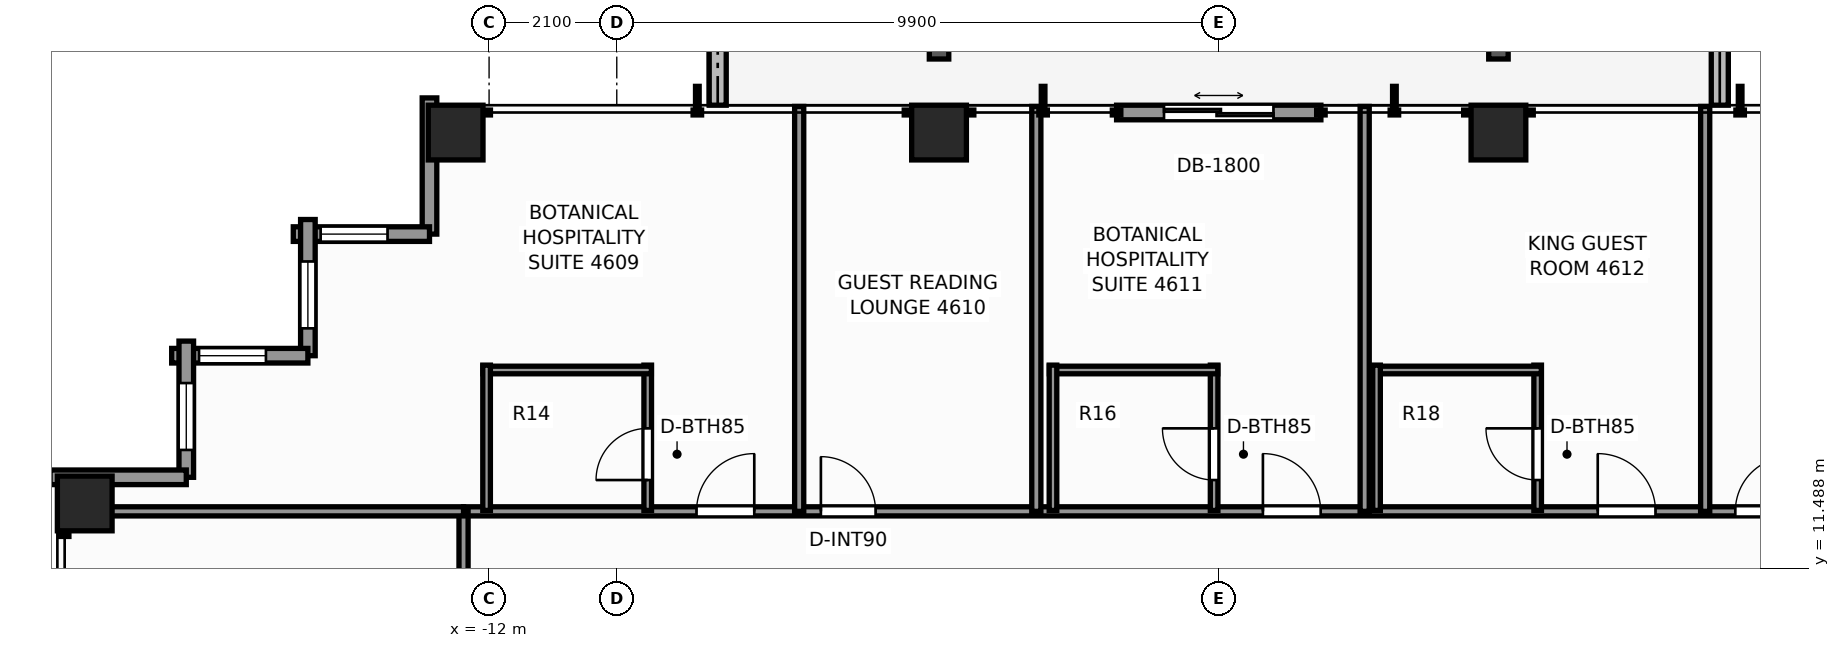
"""IFC4 building model, lengths in metres.
Left out: names, types, materials, properties, quantities, classifications, styles, units other than length and angle.
Written with IfcOpenShell. Run it as: python <this file> out.ifc"""

import sys

from ifc_helpers import new_model, si_unit, direction, frame, frame_2d, origin, origin_2d, place, context, subcontext, project, spatial, rectangle, extrude, element, fill, save


model = new_model("IFC4")
c1 = context("Model", 3, precision=1e-05, world=origin(), true_north=direction((0.0, 1.0)))
c2 = subcontext(c1, "Body", "Model", "MODEL_VIEW")
j1 = project(units=[si_unit("LENGTHUNIT", "METRE"), si_unit("PLANEANGLEUNIT", "RADIAN")], contexts=[c1])
p1 = place(None, origin())
s1 = spatial("IfcSite", under=j1, at=p1, CompositionType="ELEMENT")
p2 = place(p1, origin())
s2 = spatial("IfcBuilding", under=s1, at=p2, CompositionType="ELEMENT")
p3 = place(p2, frame((0.0, 0.0, 160.2)))
s3 = spatial("IfcBuildingStorey", under=s2, at=p3, CompositionType="ELEMENT", Elevation=160.2)
for number, where, z_axis, x_axis in (
    (1, (-12.55, 18.65, 0.0), (0.0, 0.0, 1.0), (1.0, 0.0, 0.0)),
    (2, (-4.6, 18.65, 0.0), (0.0, 0.0, 1.0), (1.0, 0.0, 0.0)),
    (3, (4.6, 18.65, 0.0), (0.0, 0.0, 1.0), (1.0, 0.0, 0.0)),
    (4, (-18.65, 12.55, 0.0), (0.0, 0.0, 1.0), (1.0, 0.0, 0.0)),
):
    element("IfcColumn", number, at=place(p3, frame(where, z_axis=z_axis, x_axis=x_axis)), inside=s3, PredefinedType="COLUMN", context=c2, shape_type="SweptSolid", body=[
        extrude(rectangle(XDim=0.9, YDim=0.9, at=origin_2d()), origin(), (0.0, 0.0, 1.0), 3.3),
    ])
p4 = place(p3, frame((8.24, 19.1, -0.02), z_axis=(0.0, 0.0, 1.0), x_axis=(0.0, 1.0, 0.0)))
e5 = element("IfcWall", 5, at=p4, inside=s3, PredefinedType="PARAPET", context=c2, shape_type="SweptSolid", body=[
    extrude(rectangle(XDim=2.34, YDim=0.28, at=frame_2d((1.17, 0.0))), origin(), (0.0, 0.0, 1.0), 0.42),
])
p5 = place(p3, frame((-8.24, 22.467, -0.02), z_axis=(0.0, 0.0, 1.0), x_axis=(0.0, -1.0, 0.0)))
e6 = element("IfcWall", 6, at=p5, inside=s3, PredefinedType="PARAPET", context=c2, shape_type="SweptSolid", body=[
    extrude(rectangle(XDim=3.367, YDim=0.28, at=frame_2d((1.684, 0.0))), origin(), (0.0, 0.0, 1.0), 0.42),
])
p6 = place(p3, frame((-1.68, 18.98, 0.0), z_axis=(0.0, 0.0, 1.0), x_axis=(1.0, 0.0, 0.0)))
e7 = element("IfcWall", 7, at=p6, inside=s3, PredefinedType="STANDARD", context=c2, shape_type="SweptSolid", body=[
    extrude(rectangle(XDim=3.36, YDim=0.24, at=frame_2d((1.68, 0.0))), origin(), (0.0, 0.0, 1.0), 3.1),
])
p7 = place(p6, frame((0.78, 0.0, 0.0)))
e8 = element("IfcOpeningElement", 8, at=p7, cuts=e7, PredefinedType="OPENING", context=c2, shape_type="SweptSolid", body=[
    extrude(rectangle(XDim=1.8, YDim=2.2, at=frame_2d((0.9, 1.1))), frame((0.0, 0.13, 0.0), z_axis=(0.0, -1.0, 0.0), x_axis=(1.0, 0.0, 0.0)), (0.0, 0.0, 1.0), 0.26),
])
p8 = place(p3, frame((-12.98, 16.98, 0.0), z_axis=(0.0, 0.0, 1.0), x_axis=(0.0, 1.0, 0.0)))
e9 = element("IfcWall", 9, at=p8, inside=s3, PredefinedType="STANDARD", context=c2, shape_type="SweptSolid", body=[
    extrude(rectangle(XDim=2.24, YDim=0.24, at=frame_2d((1.12, 0.0))), origin(), (0.0, 0.0, 1.0), 2.483),
])
p9 = place(p3, frame((-15.22, 16.98, 0.0), z_axis=(0.0, 0.0, 1.0), x_axis=(1.0, 0.0, 0.0)))
e10 = element("IfcWall", 10, at=p9, inside=s3, PredefinedType="STANDARD", context=c2, shape_type="SweptSolid", body=[
    extrude(rectangle(XDim=2.24, YDim=0.24, at=frame_2d((1.12, 0.0))), origin(), (0.0, 0.0, 1.0), 2.483),
])
p10 = place(p9, frame((0.45, 0.0, 0.65)))
e11 = element("IfcOpeningElement", 11, at=p10, cuts=e10, PredefinedType="OPENING", context=c2, shape_type="SweptSolid", body=[
    extrude(rectangle(XDim=1.1, YDim=1.45, at=frame_2d((0.55, 0.725))), frame((0.0, 0.13, 0.0), z_axis=(0.0, -1.0, 0.0), x_axis=(1.0, 0.0, 0.0)), (0.0, 0.0, 1.0), 0.26),
])
p11 = place(p3, frame((-14.98, 14.98, 0.0), z_axis=(0.0, 0.0, 1.0), x_axis=(0.0, 1.0, 0.0)))
e12 = element("IfcWall", 12, at=p11, inside=s3, PredefinedType="STANDARD", context=c2, shape_type="SweptSolid", body=[
    extrude(rectangle(XDim=2.24, YDim=0.24, at=frame_2d((1.12, 0.0))), origin(), (0.0, 0.0, 1.0), 2.483),
])
p12 = place(p11, frame((0.45, 0.0, 0.65)))
e13 = element("IfcOpeningElement", 13, at=p12, cuts=e12, PredefinedType="OPENING", context=c2, shape_type="SweptSolid", body=[
    extrude(rectangle(XDim=1.1, YDim=1.45, at=frame_2d((0.55, 0.725))), frame((0.0, 0.13, 0.0), z_axis=(0.0, -1.0, 0.0), x_axis=(1.0, 0.0, 0.0)), (0.0, 0.0, 1.0), 0.26),
])
p13 = place(p3, frame((-17.22, 14.98, 0.0), z_axis=(0.0, 0.0, 1.0), x_axis=(1.0, 0.0, 0.0)))
e14 = element("IfcWall", 14, at=p13, inside=s3, PredefinedType="STANDARD", context=c2, shape_type="SweptSolid", body=[
    extrude(rectangle(XDim=2.24, YDim=0.24, at=frame_2d((1.12, 0.0))), origin(), (0.0, 0.0, 1.0), 2.483),
])
p14 = place(p13, frame((0.45, 0.0, 0.65)))
e15 = element("IfcOpeningElement", 15, at=p14, cuts=e14, PredefinedType="OPENING", context=c2, shape_type="SweptSolid", body=[
    extrude(rectangle(XDim=1.1, YDim=1.45, at=frame_2d((0.55, 0.725))), frame((0.0, 0.13, 0.0), z_axis=(0.0, -1.0, 0.0), x_axis=(1.0, 0.0, 0.0)), (0.0, 0.0, 1.0), 0.26),
])
p15 = place(p3, frame((-16.98, 12.98, 0.0), z_axis=(0.0, 0.0, 1.0), x_axis=(0.0, 1.0, 0.0)))
e16 = element("IfcWall", 16, at=p15, inside=s3, PredefinedType="STANDARD", context=c2, shape_type="SweptSolid", body=[
    extrude(rectangle(XDim=2.24, YDim=0.24, at=frame_2d((1.12, 0.0))), origin(), (0.0, 0.0, 1.0), 2.483),
])
p16 = place(p15, frame((0.45, 0.0, 0.65)))
e17 = element("IfcOpeningElement", 17, at=p16, cuts=e16, PredefinedType="OPENING", context=c2, shape_type="SweptSolid", body=[
    extrude(rectangle(XDim=1.1, YDim=1.45, at=frame_2d((0.55, 0.725))), frame((0.0, 0.13, 0.0), z_axis=(0.0, -1.0, 0.0), x_axis=(1.0, 0.0, 0.0)), (0.0, 0.0, 1.0), 0.26),
])
p17 = place(p3, frame((-19.22, 12.98, 0.0), z_axis=(0.0, 0.0, 1.0), x_axis=(1.0, 0.0, 0.0)))
e18 = element("IfcWall", 18, at=p17, inside=s3, PredefinedType="STANDARD", context=c2, shape_type="SweptSolid", body=[
    extrude(rectangle(XDim=2.24, YDim=0.24, at=frame_2d((1.12, 0.0))), origin(), (0.0, 0.0, 1.0), 2.483),
])
p18 = place(p3, frame((-12.42, 12.42, 0.0), z_axis=(0.0, 0.0, 1.0), x_axis=(1.0, 0.0, 0.0)))
e19 = element("IfcWall", 19, at=p18, inside=s3, PredefinedType="PARTITIONING", context=c2, shape_type="SweptSolid", body=[
    extrude(rectangle(XDim=24.84, YDim=0.15, at=frame_2d((12.42, 0.0))), origin(), (0.0, 0.0, 1.0), 2.389),
])
p19 = place(p18, frame((3.831, 0.0, 0.0)))
e20 = element("IfcOpeningElement", 20, at=p19, cuts=e19, PredefinedType="OPENING", context=c2, shape_type="SweptSolid", body=[
    extrude(rectangle(XDim=0.95, YDim=2.06, at=frame_2d((0.475, 1.03))), frame((0.0, 0.085, 0.0), z_axis=(0.0, -1.0, 0.0), x_axis=(1.0, 0.0, 0.0)), (0.0, 0.0, 1.0), 0.17),
])
p20 = place(p18, frame((5.877, 0.0, 0.0)))
e21 = element("IfcOpeningElement", 21, at=p20, cuts=e19, PredefinedType="OPENING", context=c2, shape_type="SweptSolid", body=[
    extrude(rectangle(XDim=0.9, YDim=2.06, at=frame_2d((0.45, 1.03))), frame((0.0, 0.085, 0.0), z_axis=(0.0, -1.0, 0.0), x_axis=(1.0, 0.0, 0.0)), (0.0, 0.0, 1.0), 0.17),
])
p21 = place(p18, frame((13.146, 0.0, 0.0)))
e22 = element("IfcOpeningElement", 22, at=p21, cuts=e19, PredefinedType="OPENING", context=c2, shape_type="SweptSolid", body=[
    extrude(rectangle(XDim=0.95, YDim=2.06, at=frame_2d((0.475, 1.03))), frame((0.0, 0.085, 0.0), z_axis=(0.0, -1.0, 0.0), x_axis=(1.0, 0.0, 0.0)), (0.0, 0.0, 1.0), 0.17),
])
p22 = place(p18, frame((18.653, 0.0, 0.0)))
e23 = element("IfcOpeningElement", 23, at=p22, cuts=e19, PredefinedType="OPENING", context=c2, shape_type="SweptSolid", body=[
    extrude(rectangle(XDim=0.95, YDim=2.06, at=frame_2d((0.475, 1.03))), frame((0.0, 0.085, 0.0), z_axis=(0.0, -1.0, 0.0), x_axis=(1.0, 0.0, 0.0)), (0.0, 0.0, 1.0), 0.17),
])
p23 = place(p18, frame((20.916, 0.0, 0.0)))
e24 = element("IfcOpeningElement", 24, at=p23, cuts=e19, PredefinedType="OPENING", context=c2, shape_type="SweptSolid", body=[
    extrude(rectangle(XDim=0.9, YDim=2.06, at=frame_2d((0.45, 1.03))), frame((0.0, 0.085, 0.0), z_axis=(0.0, -1.0, 0.0), x_axis=(1.0, 0.0, 0.0)), (0.0, 0.0, 1.0), 0.17),
])
p24 = place(p3, frame((-12.42, -12.42, 0.0), z_axis=(0.0, 0.0, 1.0), x_axis=(0.0, 1.0, 0.0)))
e25 = element("IfcWall", 25, at=p24, inside=s3, PredefinedType="PARTITIONING", context=c2, shape_type="SweptSolid", body=[
    extrude(rectangle(XDim=24.84, YDim=0.15, at=frame_2d((12.42, 0.0))), origin(), (0.0, 0.0, 1.0), 2.389),
])
p25 = place(p24, frame((3.831, 0.0, 0.0)))
e26 = element("IfcOpeningElement", 26, at=p25, cuts=e25, PredefinedType="OPENING", context=c2, shape_type="SweptSolid", body=[
    extrude(rectangle(XDim=0.95, YDim=2.06, at=frame_2d((0.475, 1.03))), frame((0.0, 0.085, 0.0), z_axis=(0.0, -1.0, 0.0), x_axis=(1.0, 0.0, 0.0)), (0.0, 0.0, 1.0), 0.17),
])
p26 = place(p24, frame((10.012, 0.0, 0.0)))
e27 = element("IfcOpeningElement", 27, at=p26, cuts=e25, PredefinedType="OPENING", context=c2, shape_type="SweptSolid", body=[
    extrude(rectangle(XDim=0.95, YDim=2.06, at=frame_2d((0.475, 1.03))), frame((0.0, 0.085, 0.0), z_axis=(0.0, -1.0, 0.0), x_axis=(1.0, 0.0, 0.0)), (0.0, 0.0, 1.0), 0.17),
])
p27 = place(p24, frame((19.504, 0.0, 0.0)))
e28 = element("IfcOpeningElement", 28, at=p27, cuts=e25, PredefinedType="OPENING", context=c2, shape_type="SweptSolid", body=[
    extrude(rectangle(XDim=0.95, YDim=2.06, at=frame_2d((0.475, 1.03))), frame((0.0, 0.085, 0.0), z_axis=(0.0, -1.0, 0.0), x_axis=(1.0, 0.0, 0.0)), (0.0, 0.0, 1.0), 0.17),
])
p28 = place(p3, frame((-19.08, 12.42, 0.0), z_axis=(0.0, 0.0, 1.0), x_axis=(1.0, 0.0, 0.0)))
e29 = element("IfcWall", 29, at=p28, inside=s3, PredefinedType="PARTITIONING", context=c2, shape_type="SweptSolid", body=[
    extrude(rectangle(XDim=6.66, YDim=0.15, at=frame_2d((3.33, 0.0))), origin(), (0.0, 0.0, 1.0), 2.389),
])
p29 = place(p3, frame((-6.9, 12.42, 0.0), z_axis=(0.0, 0.0, 1.0), x_axis=(0.0, 1.0, 0.0)))
e30 = element("IfcWall", 30, at=p29, inside=s3, PredefinedType="PARTITIONING", context=c2, shape_type="SweptSolid", body=[
    extrude(rectangle(XDim=6.66, YDim=0.15, at=frame_2d((3.33, 0.0))), origin(), (0.0, 0.0, 1.0), 2.473),
])
p30 = place(p3, frame((-9.391, 12.435, 0.0), z_axis=(0.0, 0.0, 1.0), x_axis=(0.0, 1.0, 0.0)))
e31 = element("IfcWall", 31, at=p30, inside=s3, PredefinedType="PARTITIONING", context=c2, shape_type="SweptSolid", body=[
    extrude(rectangle(XDim=2.39, YDim=0.125, at=frame_2d((1.195, 0.0))), origin(), (0.0, 0.0, 1.0), 3.1),
])
p31 = place(p30, frame((0.5, 0.0, 0.0)))
e32 = element("IfcOpeningElement", 32, at=p31, cuts=e31, PredefinedType="OPENING", context=c2, shape_type="SweptSolid", body=[
    extrude(rectangle(XDim=0.85, YDim=2.03, at=frame_2d((0.425, 1.015))), frame((0.0, 0.073, 0.0), z_axis=(0.0, -1.0, 0.0), x_axis=(1.0, 0.0, 0.0)), (0.0, 0.0, 1.0), 0.145),
])
p32 = place(p3, frame((-12.101, 14.745, 0.0), z_axis=(0.0, 0.0, 1.0), x_axis=(1.0, 0.0, 0.0)))
e33 = element("IfcWall", 33, at=p32, inside=s3, PredefinedType="PARTITIONING", context=c2, shape_type="SweptSolid", body=[
    extrude(rectangle(XDim=2.77, YDim=0.125, at=frame_2d((1.385, 0.0))), origin(), (0.0, 0.0, 1.0), 2.389),
])
p33 = place(p3, frame((-12.041, 12.435, 0.0), z_axis=(0.0, 0.0, 1.0), x_axis=(0.0, 1.0, 0.0)))
e34 = element("IfcWall", 34, at=p33, inside=s3, PredefinedType="PARTITIONING", context=c2, shape_type="SweptSolid", body=[
    extrude(rectangle(XDim=2.39, YDim=0.125, at=frame_2d((1.195, 0.0))), origin(), (0.0, 0.0, 1.0), 3.1),
])
for number, where, z_axis, x_axis in (
    (35, (-3.0, 12.42, 0.0), (0.0, 0.0, 1.0), (0.0, 1.0, 0.0)),
    (36, (2.4, 12.42, 0.0), (0.0, 0.0, 1.0), (0.0, 1.0, 0.0)),
):
    element("IfcWall", number, at=place(p3, frame(where, z_axis=z_axis, x_axis=x_axis)), inside=s3, PredefinedType="PARTITIONING", context=c2, shape_type="SweptSolid", body=[
        extrude(rectangle(XDim=6.66, YDim=0.15, at=frame_2d((3.33, 0.0))), origin(), (0.0, 0.0, 1.0), 2.473),
    ])
p34 = place(p3, frame((-0.076, 12.435, 0.0), z_axis=(0.0, 0.0, 1.0), x_axis=(0.0, 1.0, 0.0)))
e37 = element("IfcWall", 37, at=p34, inside=s3, PredefinedType="PARTITIONING", context=c2, shape_type="SweptSolid", body=[
    extrude(rectangle(XDim=2.39, YDim=0.125, at=frame_2d((1.195, 0.0))), origin(), (0.0, 0.0, 1.0), 2.625),
])
p35 = place(p34, frame((0.5, 0.0, 0.0)))
e38 = element("IfcOpeningElement", 38, at=p35, cuts=e37, PredefinedType="OPENING", context=c2, shape_type="SweptSolid", body=[
    extrude(rectangle(XDim=0.85, YDim=2.03, at=frame_2d((0.425, 1.015))), frame((0.0, 0.073, 0.0), z_axis=(0.0, -1.0, 0.0), x_axis=(1.0, 0.0, 0.0)), (0.0, 0.0, 1.0), 0.145),
])
p36 = place(p3, frame((-2.786, 14.745, 0.0), z_axis=(0.0, 0.0, 1.0), x_axis=(1.0, 0.0, 0.0)))
e39 = element("IfcWall", 39, at=p36, inside=s3, PredefinedType="PARTITIONING", context=c2, shape_type="SweptSolid", body=[
    extrude(rectangle(XDim=2.77, YDim=0.125, at=frame_2d((1.385, 0.0))), origin(), (0.0, 0.0, 1.0), 2.625),
])
p37 = place(p3, frame((-2.726, 12.435, 0.0), z_axis=(0.0, 0.0, 1.0), x_axis=(0.0, 1.0, 0.0)))
e40 = element("IfcWall", 40, at=p37, inside=s3, PredefinedType="PARTITIONING", context=c2, shape_type="SweptSolid", body=[
    extrude(rectangle(XDim=2.39, YDim=0.125, at=frame_2d((1.195, 0.0))), origin(), (0.0, 0.0, 1.0), 3.1),
])
p38 = place(p3, frame((8.0, 12.42, 0.0), z_axis=(0.0, 0.0, 1.0), x_axis=(0.0, 1.0, 0.0)))
e41 = element("IfcWall", 41, at=p38, inside=s3, PredefinedType="PARTITIONING", context=c2, shape_type="SweptSolid", body=[
    extrude(rectangle(XDim=6.66, YDim=0.15, at=frame_2d((3.33, 0.0))), origin(), (0.0, 0.0, 1.0), 2.473),
])
p39 = place(p3, frame((5.245, 12.435, 0.0), z_axis=(0.0, 0.0, 1.0), x_axis=(0.0, 1.0, 0.0)))
e42 = element("IfcWall", 42, at=p39, inside=s3, PredefinedType="PARTITIONING", context=c2, shape_type="SweptSolid", body=[
    extrude(rectangle(XDim=2.39, YDim=0.125, at=frame_2d((1.195, 0.0))), origin(), (0.0, 0.0, 1.0), 3.1),
])
p40 = place(p39, frame((0.5, 0.0, 0.0)))
e43 = element("IfcOpeningElement", 43, at=p40, cuts=e42, PredefinedType="OPENING", context=c2, shape_type="SweptSolid", body=[
    extrude(rectangle(XDim=0.85, YDim=2.03, at=frame_2d((0.425, 1.015))), frame((0.0, 0.073, 0.0), z_axis=(0.0, -1.0, 0.0), x_axis=(1.0, 0.0, 0.0)), (0.0, 0.0, 1.0), 0.145),
])
p41 = place(p3, frame((2.535, 14.745, 0.0), z_axis=(0.0, 0.0, 1.0), x_axis=(1.0, 0.0, 0.0)))
e44 = element("IfcWall", 44, at=p41, inside=s3, PredefinedType="PARTITIONING", context=c2, shape_type="SweptSolid", body=[
    extrude(rectangle(XDim=2.77, YDim=0.125, at=frame_2d((1.385, 0.0))), origin(), (0.0, 0.0, 1.0), 2.389),
])
p42 = place(p3, frame((2.595, 12.435, 0.0), z_axis=(0.0, 0.0, 1.0), x_axis=(0.0, 1.0, 0.0)))
e45 = element("IfcWall", 45, at=p42, inside=s3, PredefinedType="PARTITIONING", context=c2, shape_type="SweptSolid", body=[
    extrude(rectangle(XDim=2.39, YDim=0.125, at=frame_2d((1.195, 0.0))), origin(), (0.0, 0.0, 1.0), 3.1),
])
p43 = place(p7, origin())
e46 = element("IfcDoor", 46, at=p43, inside=s3, OperationType="DOUBLE_DOOR_SLIDING", PredefinedType="DOOR", context=c2, shape_type="SweptSolid", body=[
    extrude(rectangle(XDim=1.8, YDim=2.2, at=frame_2d((0.9, 1.1))), frame((0.0, 0.025, 0.0), z_axis=(0.0, -1.0, 0.0), x_axis=(1.0, 0.0, 0.0)), (0.0, 0.0, 1.0), 0.05),
])
fill(e8, e46)
p44 = place(p10, origin())
e47 = element("IfcWindow", 47, at=p44, inside=s3, PartitioningType="SINGLE_PANEL", PredefinedType="WINDOW", context=c2, shape_type="SweptSolid", body=[
    extrude(rectangle(XDim=1.1, YDim=1.45, at=frame_2d((0.55, 0.725))), frame((0.0, 0.03, 0.0), z_axis=(0.0, -1.0, 0.0), x_axis=(1.0, 0.0, 0.0)), (0.0, 0.0, 1.0), 0.06),
])
fill(e11, e47)
p45 = place(p12, origin())
e48 = element("IfcWindow", 48, at=p45, inside=s3, PartitioningType="SINGLE_PANEL", PredefinedType="WINDOW", context=c2, shape_type="SweptSolid", body=[
    extrude(rectangle(XDim=1.1, YDim=1.45, at=frame_2d((0.55, 0.725))), frame((0.0, 0.03, 0.0), z_axis=(0.0, -1.0, 0.0), x_axis=(1.0, 0.0, 0.0)), (0.0, 0.0, 1.0), 0.06),
])
fill(e13, e48)
p46 = place(p14, origin())
e49 = element("IfcWindow", 49, at=p46, inside=s3, PartitioningType="SINGLE_PANEL", PredefinedType="WINDOW", context=c2, shape_type="SweptSolid", body=[
    extrude(rectangle(XDim=1.1, YDim=1.45, at=frame_2d((0.55, 0.725))), frame((0.0, 0.03, 0.0), z_axis=(0.0, -1.0, 0.0), x_axis=(1.0, 0.0, 0.0)), (0.0, 0.0, 1.0), 0.06),
])
fill(e15, e49)
p47 = place(p16, origin())
e50 = element("IfcWindow", 50, at=p47, inside=s3, PartitioningType="SINGLE_PANEL", PredefinedType="WINDOW", context=c2, shape_type="SweptSolid", body=[
    extrude(rectangle(XDim=1.1, YDim=1.45, at=frame_2d((0.55, 0.725))), frame((0.0, 0.03, 0.0), z_axis=(0.0, -1.0, 0.0), x_axis=(1.0, 0.0, 0.0)), (0.0, 0.0, 1.0), 0.06),
])
fill(e17, e50)
p48 = place(p31, origin())
e51 = element("IfcDoor", 51, at=p48, inside=s3, OperationType="SINGLE_SWING_LEFT", PredefinedType="DOOR", context=c2, shape_type="SweptSolid", body=[
    extrude(rectangle(XDim=0.85, YDim=2.03, at=frame_2d((0.425, 1.015))), frame((0.0, 0.025, 0.0), z_axis=(0.0, -1.0, 0.0), x_axis=(1.0, 0.0, 0.0)), (0.0, 0.0, 1.0), 0.05),
])
fill(e32, e51)
p49 = place(p19, origin())
e52 = element("IfcDoor", 52, at=p49, inside=s3, OperationType="SINGLE_SWING_RIGHT", PredefinedType="DOOR", context=c2, shape_type="SweptSolid", body=[
    extrude(rectangle(XDim=0.95, YDim=2.06, at=frame_2d((0.475, 1.03))), frame((0.0, 0.025, 0.0), z_axis=(0.0, -1.0, 0.0), x_axis=(1.0, 0.0, 0.0)), (0.0, 0.0, 1.0), 0.05),
])
fill(e20, e52)
p50 = place(p20, origin())
e53 = element("IfcDoor", 53, at=p50, inside=s3, OperationType="SINGLE_SWING_LEFT", PredefinedType="DOOR", context=c2, shape_type="SweptSolid", body=[
    extrude(rectangle(XDim=0.9, YDim=2.06, at=frame_2d((0.45, 1.03))), frame((0.0, 0.025, 0.0), z_axis=(0.0, -1.0, 0.0), x_axis=(1.0, 0.0, 0.0)), (0.0, 0.0, 1.0), 0.05),
])
fill(e21, e53)
p51 = place(p35, origin())
e54 = element("IfcDoor", 54, at=p51, inside=s3, OperationType="SINGLE_SWING_RIGHT", PredefinedType="DOOR", context=c2, shape_type="SweptSolid", body=[
    extrude(rectangle(XDim=0.85, YDim=2.03, at=frame_2d((0.425, 1.015))), frame((0.0, 0.025, 0.0), z_axis=(0.0, -1.0, 0.0), x_axis=(1.0, 0.0, 0.0)), (0.0, 0.0, 1.0), 0.05),
])
fill(e38, e54)
p52 = place(p21, origin())
e55 = element("IfcDoor", 55, at=p52, inside=s3, OperationType="SINGLE_SWING_LEFT", PredefinedType="DOOR", context=c2, shape_type="SweptSolid", body=[
    extrude(rectangle(XDim=0.95, YDim=2.06, at=frame_2d((0.475, 1.03))), frame((0.0, 0.025, 0.0), z_axis=(0.0, -1.0, 0.0), x_axis=(1.0, 0.0, 0.0)), (0.0, 0.0, 1.0), 0.05),
])
fill(e22, e55)
p53 = place(p40, origin())
e56 = element("IfcDoor", 56, at=p53, inside=s3, OperationType="SINGLE_SWING_RIGHT", PredefinedType="DOOR", context=c2, shape_type="SweptSolid", body=[
    extrude(rectangle(XDim=0.85, YDim=2.03, at=frame_2d((0.425, 1.015))), frame((0.0, 0.025, 0.0), z_axis=(0.0, -1.0, 0.0), x_axis=(1.0, 0.0, 0.0)), (0.0, 0.0, 1.0), 0.05),
])
fill(e43, e56)
p54 = place(p22, origin())
e57 = element("IfcDoor", 57, at=p54, inside=s3, OperationType="SINGLE_SWING_LEFT", PredefinedType="DOOR", context=c2, shape_type="SweptSolid", body=[
    extrude(rectangle(XDim=0.95, YDim=2.06, at=frame_2d((0.475, 1.03))), frame((0.0, 0.025, 0.0), z_axis=(0.0, -1.0, 0.0), x_axis=(1.0, 0.0, 0.0)), (0.0, 0.0, 1.0), 0.05),
])
fill(e23, e57)
p55 = place(p23, origin())
e58 = element("IfcDoor", 58, at=p55, inside=s3, OperationType="SINGLE_SWING_RIGHT", PredefinedType="DOOR", context=c2, shape_type="SweptSolid", body=[
    extrude(rectangle(XDim=0.9, YDim=2.06, at=frame_2d((0.45, 1.03))), frame((0.0, 0.025, 0.0), z_axis=(0.0, -1.0, 0.0), x_axis=(1.0, 0.0, 0.0)), (0.0, 0.0, 1.0), 0.05),
])
fill(e24, e58)
save(model, sys.argv[1])
